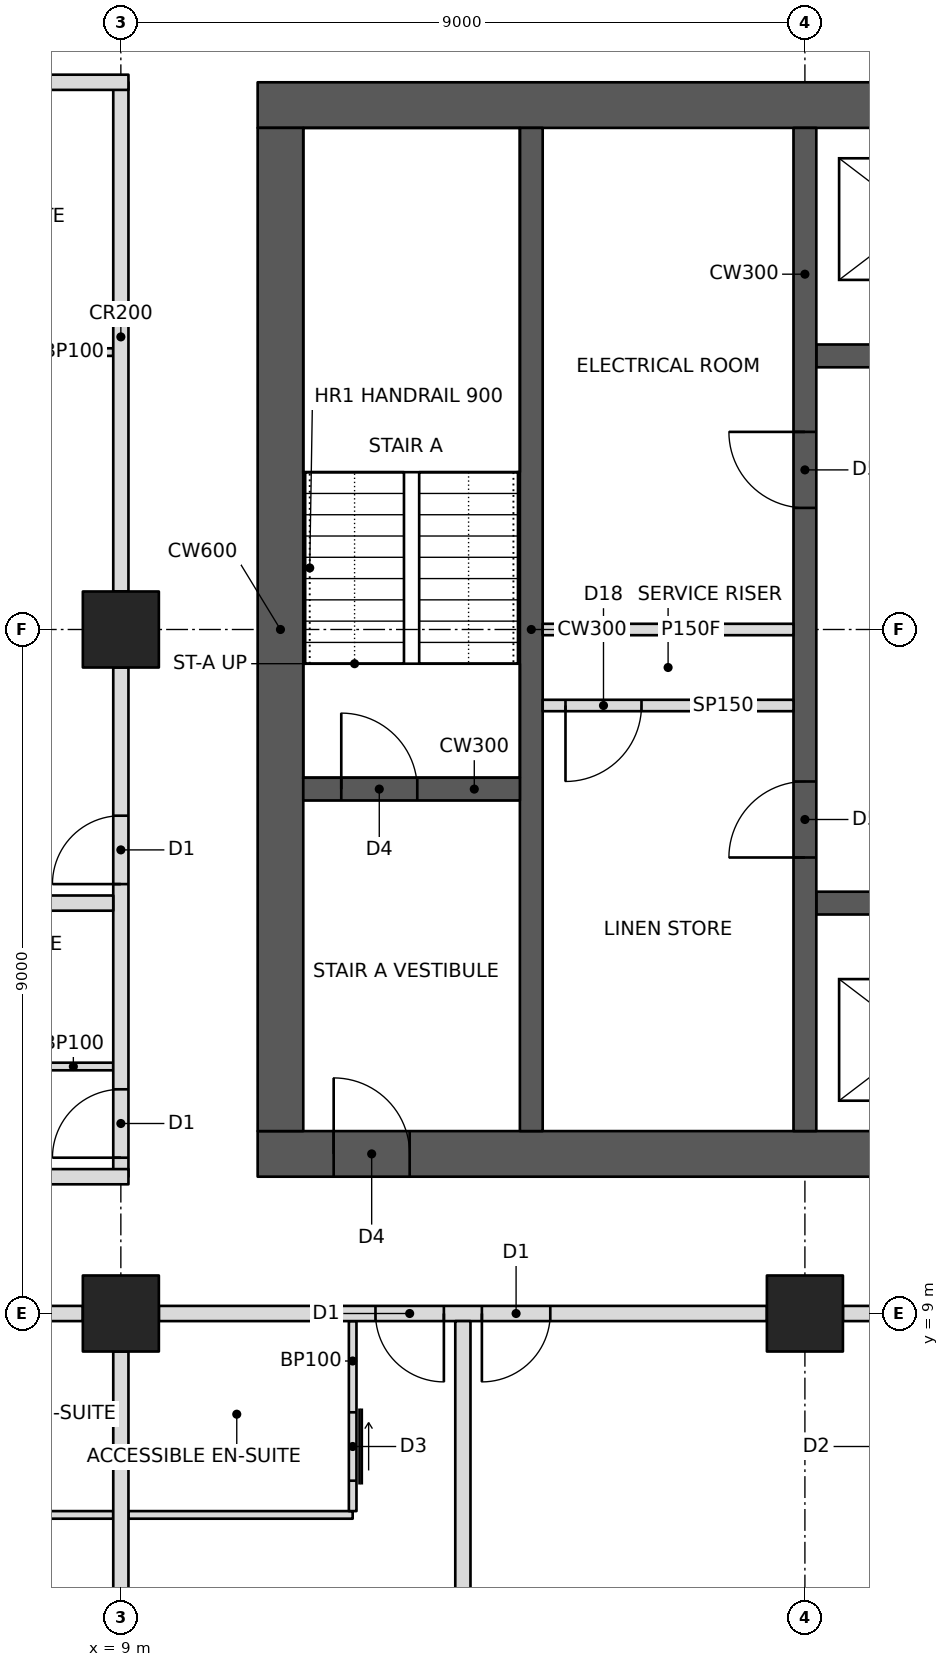
"""IFC4 building model, lengths in metres.
Left out: names, types, materials, properties, quantities, classifications, styles, units other than length and angle.
Written with IfcOpenShell. Run it as: python <this file> out.ifc"""

import sys

from ifc_helpers import new_model, si_unit, direction, frame, frame_2d, origin, origin_2d, place, context, subcontext, project, spatial, rectangle, hollow_rectangle, extrude, element, fill, save


model = new_model("IFC4")
c1 = context("Model", 3, precision=1e-05, world=origin(), true_north=direction((0.0, 1.0)))
c2 = subcontext(c1, "Body", "Model", "MODEL_VIEW")
j1 = project(units=[si_unit("LENGTHUNIT", "METRE"), si_unit("PLANEANGLEUNIT", "RADIAN")], contexts=[c1])
p1 = place(None, origin())
s1 = spatial("IfcSite", under=j1, at=p1, CompositionType="ELEMENT")
p2 = place(p1, origin())
s2 = spatial("IfcBuilding", under=s1, at=p2, CompositionType="ELEMENT")
p3 = place(p2, frame((0.0, 0.0, 97.6)))
s3 = spatial("IfcBuildingStorey", under=s2, at=p3, CompositionType="ELEMENT", Elevation=97.6)
for number, where, z_axis, x_axis in (
    (1, (9.0, 9.0, 0.0), (0.0, 0.0, 1.0), (1.0, 0.0, 0.0)),
    (2, (9.0, 18.0, 0.0), (0.0, 0.0, 1.0), (1.0, 0.0, 0.0)),
    (3, (18.0, 9.0, 0.0), (0.0, 0.0, 1.0), (1.0, 0.0, 0.0)),
):
    element("IfcColumn", number, at=place(p3, frame(where, z_axis=z_axis, x_axis=x_axis)), inside=s3, PredefinedType="COLUMN", context=c2, shape_type="SweptSolid", body=[
        extrude(hollow_rectangle(XDim=1.0, YDim=1.0, WallThickness=0.1, at=origin_2d()), origin(), (0.0, 0.0, 1.0), 3.4),
    ])
p4 = place(p3, frame((10.8, 11.1, 0.0), z_axis=(0.0, 0.0, 1.0), x_axis=(1.0, 0.0, 0.0)))
e4 = element("IfcWall", 4, at=p4, inside=s3, PredefinedType="SHEAR", context=c2, shape_type="SweptSolid", body=[
    extrude(rectangle(XDim=23.4, YDim=0.6, at=frame_2d((11.7, 0.0))), origin(), (0.0, 0.0, 1.0), 3.4),
])
p5 = place(p4, frame((1.0, 0.0, 0.0)))
e5 = element("IfcOpeningElement", 5, at=p5, cuts=e4, PredefinedType="OPENING", context=c2, shape_type="SweptSolid", body=[
    extrude(rectangle(XDim=1.0, YDim=2.1, at=frame_2d((0.5, 1.05))), frame((0.0, 0.31, 0.0), z_axis=(0.0, -1.0, 0.0), x_axis=(1.0, 0.0, 0.0)), (0.0, 0.0, 1.0), 0.62),
])
p6 = place(p4, frame((17.2, 0.0, 0.0)))
e6 = element("IfcOpeningElement", 6, at=p6, cuts=e4, PredefinedType="OPENING", context=c2, shape_type="SweptSolid", body=[
    extrude(rectangle(XDim=1.8, YDim=2.1, at=frame_2d((0.9, 1.05))), frame((0.0, 0.31, 0.0), z_axis=(0.0, -1.0, 0.0), x_axis=(1.0, 0.0, 0.0)), (0.0, 0.0, 1.0), 0.62),
])
p7 = place(p3, frame((10.8, 24.9, 0.0), z_axis=(0.0, 0.0, 1.0), x_axis=(1.0, 0.0, 0.0)))
e7 = element("IfcWall", 7, at=p7, inside=s3, PredefinedType="SHEAR", context=c2, shape_type="SweptSolid", body=[
    extrude(rectangle(XDim=23.4, YDim=0.6, at=frame_2d((11.7, 0.0))), origin(), (0.0, 0.0, 1.0), 3.4),
])
p8 = place(p7, frame((17.2, 0.0, 0.0)))
e8 = element("IfcOpeningElement", 8, at=p8, cuts=e7, PredefinedType="OPENING", context=c2, shape_type="SweptSolid", body=[
    extrude(rectangle(XDim=1.8, YDim=2.1, at=frame_2d((0.9, 1.05))), frame((0.0, 0.31, 0.0), z_axis=(0.0, -1.0, 0.0), x_axis=(1.0, 0.0, 0.0)), (0.0, 0.0, 1.0), 0.62),
])
p9 = place(p7, frame((21.1, 0.0, 0.0)))
e9 = element("IfcOpeningElement", 9, at=p9, cuts=e7, PredefinedType="OPENING", context=c2, shape_type="SweptSolid", body=[
    extrude(rectangle(XDim=1.0, YDim=2.1, at=frame_2d((0.5, 1.05))), frame((0.0, 0.31, 0.0), z_axis=(0.0, -1.0, 0.0), x_axis=(1.0, 0.0, 0.0)), (0.0, 0.0, 1.0), 0.62),
])
p10 = place(p3, frame((11.1, 11.4, 0.0), z_axis=(0.0, 0.0, 1.0), x_axis=(0.0, 1.0, 0.0)))
e10 = element("IfcWall", 10, at=p10, inside=s3, PredefinedType="SHEAR", context=c2, shape_type="SweptSolid", body=[
    extrude(rectangle(XDim=13.2, YDim=0.6, at=frame_2d((6.6, 0.0))), origin(), (0.0, 0.0, 1.0), 3.4),
])
p11 = place(p3, frame((14.4, 11.4, 0.0), z_axis=(0.0, 0.0, 1.0), x_axis=(0.0, 1.0, 0.0)))
e11 = element("IfcWall", 11, at=p11, inside=s3, PredefinedType="SHEAR", context=c2, shape_type="SweptSolid", body=[
    extrude(rectangle(XDim=13.2, YDim=0.3, at=frame_2d((6.6, 0.0))), origin(), (0.0, 0.0, 1.0), 3.4),
])
p12 = place(p3, frame((11.4, 15.9, 0.0), z_axis=(0.0, 0.0, 1.0), x_axis=(1.0, 0.0, 0.0)))
e12 = element("IfcWall", 12, at=p12, inside=s3, PredefinedType="SHEAR", context=c2, shape_type="SweptSolid", body=[
    extrude(rectangle(XDim=2.85, YDim=0.3, at=frame_2d((1.425, 0.0))), origin(), (0.0, 0.0, 1.0), 3.4),
])
p13 = place(p12, frame((0.5, 0.0, 0.0)))
e13 = element("IfcOpeningElement", 13, at=p13, cuts=e12, PredefinedType="OPENING", context=c2, shape_type="SweptSolid", body=[
    extrude(rectangle(XDim=1.0, YDim=2.1, at=frame_2d((0.5, 1.05))), frame((0.0, 0.16, 0.0), z_axis=(0.0, -1.0, 0.0), x_axis=(1.0, 0.0, 0.0)), (0.0, 0.0, 1.0), 0.32),
])
p14 = place(p3, frame((18.0, 11.4, 0.0), z_axis=(0.0, 0.0, 1.0), x_axis=(0.0, 1.0, 0.0)))
e14 = element("IfcWall", 14, at=p14, inside=s3, PredefinedType="SHEAR", context=c2, shape_type="SweptSolid", body=[
    extrude(rectangle(XDim=13.2, YDim=0.3, at=frame_2d((6.6, 0.0))), origin(), (0.0, 0.0, 1.0), 3.4),
])
p15 = place(p14, frame((3.6, 0.0, 0.0)))
e15 = element("IfcOpeningElement", 15, at=p15, cuts=e14, PredefinedType="OPENING", context=c2, shape_type="SweptSolid", body=[
    extrude(rectangle(XDim=1.0, YDim=2.1, at=frame_2d((0.5, 1.05))), frame((0.0, 0.16, 0.0), z_axis=(0.0, -1.0, 0.0), x_axis=(1.0, 0.0, 0.0)), (0.0, 0.0, 1.0), 0.32),
])
p16 = place(p14, frame((8.2, 0.0, 0.0)))
e16 = element("IfcOpeningElement", 16, at=p16, cuts=e14, PredefinedType="OPENING", context=c2, shape_type="SweptSolid", body=[
    extrude(rectangle(XDim=1.0, YDim=2.1, at=frame_2d((0.5, 1.05))), frame((0.0, 0.16, 0.0), z_axis=(0.0, -1.0, 0.0), x_axis=(1.0, 0.0, 0.0)), (0.0, 0.0, 1.0), 0.32),
])
p17 = place(p3, frame((14.55, 18.0, 0.0), z_axis=(0.0, 0.0, 1.0), x_axis=(1.0, 0.0, 0.0)))
e17 = element("IfcWall", 17, at=p17, inside=s3, PredefinedType="PARTITIONING", context=c2, shape_type="SweptSolid", body=[
    extrude(rectangle(XDim=3.3, YDim=0.15, at=frame_2d((1.65, 0.0))), origin(), (0.0, 0.0, 1.0), 3.2),
])
p18 = place(p3, frame((18.15, 14.4, 0.0), z_axis=(0.0, 0.0, 1.0), x_axis=(1.0, 0.0, 0.0)))
e18 = element("IfcWall", 18, at=p18, inside=s3, PredefinedType="SHEAR", context=c2, shape_type="SweptSolid", body=[
    extrude(rectangle(XDim=9.0, YDim=0.3, at=frame_2d((4.5, 0.0))), origin(), (0.0, 0.0, 1.0), 3.4),
])
p19 = place(p18, frame((0.8, 0.0, 0.0)))
e19 = element("IfcOpeningElement", 19, at=p19, cuts=e18, PredefinedType="OPENING", context=c2, shape_type="SweptSolid", body=[
    extrude(rectangle(XDim=1.1, YDim=2.1, at=frame_2d((0.55, 1.05))), frame((0.0, 0.16, 0.0), z_axis=(0.0, -1.0, 0.0), x_axis=(1.0, 0.0, 0.0)), (0.0, 0.0, 1.0), 0.32),
])
p20 = place(p18, frame((3.8, 0.0, 0.0)))
e20 = element("IfcOpeningElement", 20, at=p20, cuts=e18, PredefinedType="OPENING", context=c2, shape_type="SweptSolid", body=[
    extrude(rectangle(XDim=1.1, YDim=2.1, at=frame_2d((0.55, 1.05))), frame((0.0, 0.16, 0.0), z_axis=(0.0, -1.0, 0.0), x_axis=(1.0, 0.0, 0.0)), (0.0, 0.0, 1.0), 0.32),
])
p21 = place(p18, frame((6.75, 0.0, 0.0)))
e21 = element("IfcOpeningElement", 21, at=p21, cuts=e18, PredefinedType="OPENING", context=c2, shape_type="SweptSolid", body=[
    extrude(rectangle(XDim=1.2, YDim=2.1, at=frame_2d((0.6, 1.05))), frame((0.0, 0.16, 0.0), z_axis=(0.0, -1.0, 0.0), x_axis=(1.0, 0.0, 0.0)), (0.0, 0.0, 1.0), 0.32),
])
p22 = place(p3, frame((18.15, 21.6, 0.0), z_axis=(0.0, 0.0, 1.0), x_axis=(1.0, 0.0, 0.0)))
e22 = element("IfcWall", 22, at=p22, inside=s3, PredefinedType="SHEAR", context=c2, shape_type="SweptSolid", body=[
    extrude(rectangle(XDim=9.0, YDim=0.3, at=frame_2d((4.5, 0.0))), origin(), (0.0, 0.0, 1.0), 3.4),
])
p23 = place(p22, frame((6.75, 0.0, 0.0)))
e23 = element("IfcOpeningElement", 23, at=p23, cuts=e22, PredefinedType="OPENING", context=c2, shape_type="SweptSolid", body=[
    extrude(rectangle(XDim=1.2, YDim=2.1, at=frame_2d((0.6, 1.05))), frame((0.0, 0.16, 0.0), z_axis=(0.0, -1.0, 0.0), x_axis=(1.0, 0.0, 0.0)), (0.0, 0.0, 1.0), 0.32),
])
p24 = place(p3, frame((1.0, 9.0, 0.0), z_axis=(0.0, 0.0, 1.0), x_axis=(1.0, 0.0, 0.0)))
e24 = element("IfcWall", 24, at=p24, inside=s3, PredefinedType="PARTITIONING", context=c2, shape_type="SweptSolid", body=[
    extrude(rectangle(XDim=7.5, YDim=0.2, at=frame_2d((3.75, 0.0))), origin(), (0.0, 0.0, 1.0), 2.438),
])
p25 = place(p24, frame((0.25, 0.0, 0.0)))
e25 = element("IfcOpeningElement", 25, at=p25, cuts=e24, PredefinedType="OPENING", context=c2, shape_type="SweptSolid", body=[
    extrude(rectangle(XDim=0.9, YDim=2.1, at=frame_2d((0.45, 1.05))), frame((0.0, 0.11, 0.0), z_axis=(0.0, -1.0, 0.0), x_axis=(1.0, 0.0, 0.0)), (0.0, 0.0, 1.0), 0.22),
])
p26 = place(p3, frame((9.5, 9.0, 0.0), z_axis=(0.0, 0.0, 1.0), x_axis=(1.0, 0.0, 0.0)))
e26 = element("IfcWall", 26, at=p26, inside=s3, PredefinedType="PARTITIONING", context=c2, shape_type="SweptSolid", body=[
    extrude(rectangle(XDim=8.0, YDim=0.2, at=frame_2d((4.0, 0.0))), origin(), (0.0, 0.0, 1.0), 2.405),
])
p27 = place(p26, frame((2.85, 0.0, 0.0)))
e27 = element("IfcOpeningElement", 27, at=p27, cuts=e26, PredefinedType="OPENING", context=c2, shape_type="SweptSolid", body=[
    extrude(rectangle(XDim=0.9, YDim=2.1, at=frame_2d((0.45, 1.05))), frame((0.0, 0.11, 0.0), z_axis=(0.0, -1.0, 0.0), x_axis=(1.0, 0.0, 0.0)), (0.0, 0.0, 1.0), 0.22),
])
p28 = place(p26, frame((4.25, 0.0, 0.0)))
e28 = element("IfcOpeningElement", 28, at=p28, cuts=e26, PredefinedType="OPENING", context=c2, shape_type="SweptSolid", body=[
    extrude(rectangle(XDim=0.9, YDim=2.1, at=frame_2d((0.45, 1.05))), frame((0.0, 0.11, 0.0), z_axis=(0.0, -1.0, 0.0), x_axis=(1.0, 0.0, 0.0)), (0.0, 0.0, 1.0), 0.22),
])
p29 = place(p3, frame((18.5, 9.0, 0.0), z_axis=(0.0, 0.0, 1.0), x_axis=(1.0, 0.0, 0.0)))
e29 = element("IfcWall", 29, at=p29, inside=s3, PredefinedType="PARTITIONING", context=c2, shape_type="SweptSolid", body=[
    extrude(rectangle(XDim=8.0, YDim=0.2, at=frame_2d((4.0, 0.0))), origin(), (0.0, 0.0, 1.0), 2.405),
])
p30 = place(p29, frame((4.25, 0.0, 0.0)))
e30 = element("IfcOpeningElement", 30, at=p30, cuts=e29, PredefinedType="OPENING", context=c2, shape_type="SweptSolid", body=[
    extrude(rectangle(XDim=0.9, YDim=2.1, at=frame_2d((0.45, 1.05))), frame((0.0, 0.11, 0.0), z_axis=(0.0, -1.0, 0.0), x_axis=(1.0, 0.0, 0.0)), (0.0, 0.0, 1.0), 0.22),
])
p31 = place(p3, frame((9.0, 10.8, 0.0), z_axis=(0.0, 0.0, 1.0), x_axis=(0.0, 1.0, 0.0)))
e31 = element("IfcWall", 31, at=p31, inside=s3, PredefinedType="PARTITIONING", context=c2, shape_type="SweptSolid", body=[
    extrude(rectangle(XDim=6.7, YDim=0.2, at=frame_2d((3.35, 0.0))), origin(), (0.0, 0.0, 1.0), 2.405),
])
p32 = place(p31, frame((0.25, 0.0, 0.0)))
e32 = element("IfcOpeningElement", 32, at=p32, cuts=e31, PredefinedType="OPENING", context=c2, shape_type="SweptSolid", body=[
    extrude(rectangle(XDim=0.9, YDim=2.1, at=frame_2d((0.45, 1.05))), frame((0.0, 0.11, 0.0), z_axis=(0.0, -1.0, 0.0), x_axis=(1.0, 0.0, 0.0)), (0.0, 0.0, 1.0), 0.22),
])
p33 = place(p31, frame((3.85, 0.0, 0.0)))
e33 = element("IfcOpeningElement", 33, at=p33, cuts=e31, PredefinedType="OPENING", context=c2, shape_type="SweptSolid", body=[
    extrude(rectangle(XDim=0.9, YDim=2.1, at=frame_2d((0.45, 1.05))), frame((0.0, 0.11, 0.0), z_axis=(0.0, -1.0, 0.0), x_axis=(1.0, 0.0, 0.0)), (0.0, 0.0, 1.0), 0.22),
])
p34 = place(p3, frame((9.0, 18.5, 0.0), z_axis=(0.0, 0.0, 1.0), x_axis=(0.0, 1.0, 0.0)))
e34 = element("IfcWall", 34, at=p34, inside=s3, PredefinedType="PARTITIONING", context=c2, shape_type="SweptSolid", body=[
    extrude(rectangle(XDim=6.7, YDim=0.2, at=frame_2d((3.35, 0.0))), origin(), (0.0, 0.0, 1.0), 2.405),
])
for number, where, z_axis, x_axis in (
    (35, (1.0, 10.8, 0.0), (0.0, 0.0, 1.0), (1.0, 0.0, 0.0)),
    (36, (1.0, 25.2, 0.0), (0.0, 0.0, 1.0), (1.0, 0.0, 0.0)),
):
    element("IfcWall", number, at=place(p3, frame(where, z_axis=z_axis, x_axis=x_axis)), inside=s3, PredefinedType="PARTITIONING", context=c2, shape_type="SweptSolid", body=[
        extrude(rectangle(XDim=8.1, YDim=0.2, at=frame_2d((4.05, 0.0))), origin(), (0.0, 0.0, 1.0), 2.404),
    ])
p35 = place(p3, frame((9.0, 8.5, 0.0), z_axis=(0.0, 0.0, 1.0), x_axis=(0.0, -1.0, 0.0)))
e37 = element("IfcWall", 37, at=p35, inside=s3, PredefinedType="PARTITIONING", context=c2, shape_type="SweptSolid", body=[
    extrude(rectangle(XDim=7.5, YDim=0.2, at=frame_2d((3.75, 0.0))), origin(), (0.0, 0.0, 1.0), 2.438),
])
p36 = place(p3, frame((13.5, 8.9, 0.0), z_axis=(0.0, 0.0, 1.0), x_axis=(0.0, -1.0, 0.0)))
e38 = element("IfcWall", 38, at=p36, inside=s3, PredefinedType="PARTITIONING", context=c2, shape_type="SweptSolid", body=[
    extrude(rectangle(XDim=7.9, YDim=0.2, at=frame_2d((3.95, 0.0))), origin(), (0.0, 0.0, 1.0), 2.404),
])
p37 = place(p3, frame((5.45, 6.35, 0.0), z_axis=(0.0, 0.0, 1.0), x_axis=(1.0, 0.0, 0.0)))
e39 = element("IfcWall", 39, at=p37, inside=s3, PredefinedType="PARTITIONING", context=c2, shape_type="SweptSolid", body=[
    extrude(rectangle(XDim=3.45, YDim=0.1, at=frame_2d((1.725, 0.0))), origin(), (0.0, 0.0, 1.0), 2.438),
])
p38 = place(p3, frame((9.1, 6.35, 0.0), z_axis=(0.0, 0.0, 1.0), x_axis=(1.0, 0.0, 0.0)))
e40 = element("IfcWall", 40, at=p38, inside=s3, PredefinedType="PARTITIONING", context=c2, shape_type="SweptSolid", body=[
    extrude(rectangle(XDim=2.95, YDim=0.1, at=frame_2d((1.475, 0.0))), origin(), (0.0, 0.0, 1.0), 2.438),
])
p39 = place(p3, frame((12.05, 8.9, 0.0), z_axis=(0.0, 0.0, 1.0), x_axis=(0.0, -1.0, 0.0)))
e41 = element("IfcWall", 41, at=p39, inside=s3, PredefinedType="PARTITIONING", context=c2, shape_type="SweptSolid", body=[
    extrude(rectangle(XDim=2.5, YDim=0.1, at=frame_2d((1.25, 0.0))), origin(), (0.0, 0.0, 1.0), 2.404),
])
p40 = place(p39, frame((1.2, 0.0, 0.0)))
e42 = element("IfcOpeningElement", 42, at=p40, cuts=e41, PredefinedType="OPENING", context=c2, shape_type="SweptSolid", body=[
    extrude(rectangle(XDim=0.9, YDim=2.1, at=frame_2d((0.45, 1.05))), frame((0.0, 0.06, 0.0), z_axis=(0.0, -1.0, 0.0), x_axis=(1.0, 0.0, 0.0)), (0.0, 0.0, 1.0), 0.12),
])
p41 = place(p3, frame((8.9, 14.4, 0.0), z_axis=(0.0, 0.0, 1.0), x_axis=(-1.0, 0.0, 0.0)))
e43 = element("IfcWall", 43, at=p41, inside=s3, PredefinedType="PARTITIONING", context=c2, shape_type="SweptSolid", body=[
    extrude(rectangle(XDim=7.9, YDim=0.2, at=frame_2d((3.95, 0.0))), origin(), (0.0, 0.0, 1.0), 2.404),
])
p42 = place(p3, frame((8.9, 12.25, 0.0), z_axis=(0.0, 0.0, 1.0), x_axis=(-1.0, 0.0, 0.0)))
e44 = element("IfcWall", 44, at=p42, inside=s3, PredefinedType="PARTITIONING", context=c2, shape_type="SweptSolid", body=[
    extrude(rectangle(XDim=2.5, YDim=0.1, at=frame_2d((1.25, 0.0))), origin(), (0.0, 0.0, 1.0), 2.404),
])
p43 = place(p42, frame((1.2, 0.0, 0.0)))
e45 = element("IfcOpeningElement", 45, at=p43, cuts=e44, PredefinedType="OPENING", context=c2, shape_type="SweptSolid", body=[
    extrude(rectangle(XDim=0.9, YDim=2.1, at=frame_2d((0.45, 1.05))), frame((0.0, 0.06, 0.0), z_axis=(0.0, -1.0, 0.0), x_axis=(1.0, 0.0, 0.0)), (0.0, 0.0, 1.0), 0.12),
])
p44 = place(p3, frame((8.9, 21.65, 0.0), z_axis=(0.0, 0.0, 1.0), x_axis=(-1.0, 0.0, 0.0)))
e46 = element("IfcWall", 46, at=p44, inside=s3, PredefinedType="PARTITIONING", context=c2, shape_type="SweptSolid", body=[
    extrude(rectangle(XDim=2.5, YDim=0.1, at=frame_2d((1.25, 0.0))), origin(), (0.0, 0.0, 1.0), 2.404),
])
p45 = place(p44, frame((1.2, 0.0, 0.0)))
e47 = element("IfcOpeningElement", 47, at=p45, cuts=e46, PredefinedType="OPENING", context=c2, shape_type="SweptSolid", body=[
    extrude(rectangle(XDim=0.9, YDim=2.1, at=frame_2d((0.45, 1.05))), frame((0.0, 0.06, 0.0), z_axis=(0.0, -1.0, 0.0), x_axis=(1.0, 0.0, 0.0)), (0.0, 0.0, 1.0), 0.12),
])
p46 = place(p3, frame((14.55, 17.0, 0.0), z_axis=(0.0, 0.0, 1.0), x_axis=(1.0, 0.0, 0.0)))
e48 = element("IfcWall", 48, at=p46, inside=s3, PredefinedType="PARTITIONING", context=c2, shape_type="SweptSolid", body=[
    extrude(rectangle(XDim=3.3, YDim=0.15, at=frame_2d((1.65, 0.0))), origin(), (0.0, 0.0, 1.0), 3.2),
])
p47 = place(p46, frame((0.3, 0.0, 0.0)))
e49 = element("IfcOpeningElement", 49, at=p47, cuts=e48, PredefinedType="OPENING", context=c2, shape_type="SweptSolid", body=[
    extrude(rectangle(XDim=1.0, YDim=2.1, at=frame_2d((0.5, 1.05))), frame((0.0, 0.085, 0.0), z_axis=(0.0, -1.0, 0.0), x_axis=(1.0, 0.0, 0.0)), (0.0, 0.0, 1.0), 0.17),
])
p48 = place(p40, origin())
e50 = element("IfcDoor", 50, at=p48, inside=s3, OperationType="SLIDING_TO_LEFT", PredefinedType="DOOR", context=c2, shape_type="SweptSolid", body=[
    extrude(rectangle(XDim=0.9, YDim=2.1, at=frame_2d((0.45, 1.05))), frame((0.0, 0.025, 0.0), z_axis=(0.0, -1.0, 0.0), x_axis=(1.0, 0.0, 0.0)), (0.0, 0.0, 1.0), 0.05),
])
fill(e42, e50)
p49 = place(p27, frame((0.9, 0.0, 0.0), z_axis=(0.0, 0.0, 1.0), x_axis=(-1.0, 0.0, 0.0)))
e51 = element("IfcDoor", 51, at=p49, inside=s3, OperationType="SINGLE_SWING_LEFT", PredefinedType="DOOR", context=c2, shape_type="SweptSolid", body=[
    extrude(rectangle(XDim=0.9, YDim=2.1, at=frame_2d((0.45, 1.05))), frame((0.0, 0.025, 0.0), z_axis=(0.0, -1.0, 0.0), x_axis=(1.0, 0.0, 0.0)), (0.0, 0.0, 1.0), 0.05),
])
fill(e27, e51)
p50 = place(p28, frame((0.9, 0.0, 0.0), z_axis=(0.0, 0.0, 1.0), x_axis=(-1.0, 0.0, 0.0)))
e52 = element("IfcDoor", 52, at=p50, inside=s3, OperationType="SINGLE_SWING_RIGHT", PredefinedType="DOOR", context=c2, shape_type="SweptSolid", body=[
    extrude(rectangle(XDim=0.9, YDim=2.1, at=frame_2d((0.45, 1.05))), frame((0.0, 0.025, 0.0), z_axis=(0.0, -1.0, 0.0), x_axis=(1.0, 0.0, 0.0)), (0.0, 0.0, 1.0), 0.05),
])
fill(e28, e52)
p51 = place(p32, origin())
e53 = element("IfcDoor", 53, at=p51, inside=s3, OperationType="SINGLE_SWING_LEFT", PredefinedType="DOOR", context=c2, shape_type="SweptSolid", body=[
    extrude(rectangle(XDim=0.9, YDim=2.1, at=frame_2d((0.45, 1.05))), frame((0.0, 0.025, 0.0), z_axis=(0.0, -1.0, 0.0), x_axis=(1.0, 0.0, 0.0)), (0.0, 0.0, 1.0), 0.05),
])
fill(e32, e53)
p52 = place(p33, origin())
e54 = element("IfcDoor", 54, at=p52, inside=s3, OperationType="SINGLE_SWING_LEFT", PredefinedType="DOOR", context=c2, shape_type="SweptSolid", body=[
    extrude(rectangle(XDim=0.9, YDim=2.1, at=frame_2d((0.45, 1.05))), frame((0.0, 0.025, 0.0), z_axis=(0.0, -1.0, 0.0), x_axis=(1.0, 0.0, 0.0)), (0.0, 0.0, 1.0), 0.05),
])
fill(e33, e54)
p53 = place(p47, frame((1.0, 0.0, 0.0), z_axis=(0.0, 0.0, 1.0), x_axis=(-1.0, 0.0, 0.0)))
e55 = element("IfcDoor", 55, at=p53, inside=s3, OperationType="SINGLE_SWING_RIGHT", PredefinedType="DOOR", context=c2, shape_type="SweptSolid", body=[
    extrude(rectangle(XDim=1.0, YDim=2.1, at=frame_2d((0.5, 1.05))), frame((0.0, 0.025, 0.0), z_axis=(0.0, -1.0, 0.0), x_axis=(1.0, 0.0, 0.0)), (0.0, 0.0, 1.0), 0.05),
])
fill(e49, e55)
p54 = place(p5, origin())
e56 = element("IfcDoor", 56, at=p54, inside=s3, OperationType="SINGLE_SWING_LEFT", PredefinedType="DOOR", context=c2, shape_type="SweptSolid", body=[
    extrude(rectangle(XDim=1.0, YDim=2.1, at=frame_2d((0.5, 1.05))), frame((0.0, 0.025, 0.0), z_axis=(0.0, -1.0, 0.0), x_axis=(1.0, 0.0, 0.0)), (0.0, 0.0, 1.0), 0.05),
])
fill(e5, e56)
p55 = place(p13, origin())
e57 = element("IfcDoor", 57, at=p55, inside=s3, OperationType="SINGLE_SWING_LEFT", PredefinedType="DOOR", context=c2, shape_type="SweptSolid", body=[
    extrude(rectangle(XDim=1.0, YDim=2.1, at=frame_2d((0.5, 1.05))), frame((0.0, 0.025, 0.0), z_axis=(0.0, -1.0, 0.0), x_axis=(1.0, 0.0, 0.0)), (0.0, 0.0, 1.0), 0.05),
])
fill(e13, e57)
p56 = place(p15, origin())
e58 = element("IfcDoor", 58, at=p56, inside=s3, OperationType="SINGLE_SWING_LEFT", PredefinedType="DOOR", context=c2, shape_type="SweptSolid", body=[
    extrude(rectangle(XDim=1.0, YDim=2.1, at=frame_2d((0.5, 1.05))), frame((0.0, 0.025, 0.0), z_axis=(0.0, -1.0, 0.0), x_axis=(1.0, 0.0, 0.0)), (0.0, 0.0, 1.0), 0.05),
])
fill(e15, e58)
p57 = place(p16, origin())
e59 = element("IfcDoor", 59, at=p57, inside=s3, OperationType="SINGLE_SWING_RIGHT", PredefinedType="DOOR", context=c2, shape_type="SweptSolid", body=[
    extrude(rectangle(XDim=1.0, YDim=2.1, at=frame_2d((0.5, 1.05))), frame((0.0, 0.025, 0.0), z_axis=(0.0, -1.0, 0.0), x_axis=(1.0, 0.0, 0.0)), (0.0, 0.0, 1.0), 0.05),
])
fill(e16, e59)
save(model, sys.argv[1])
